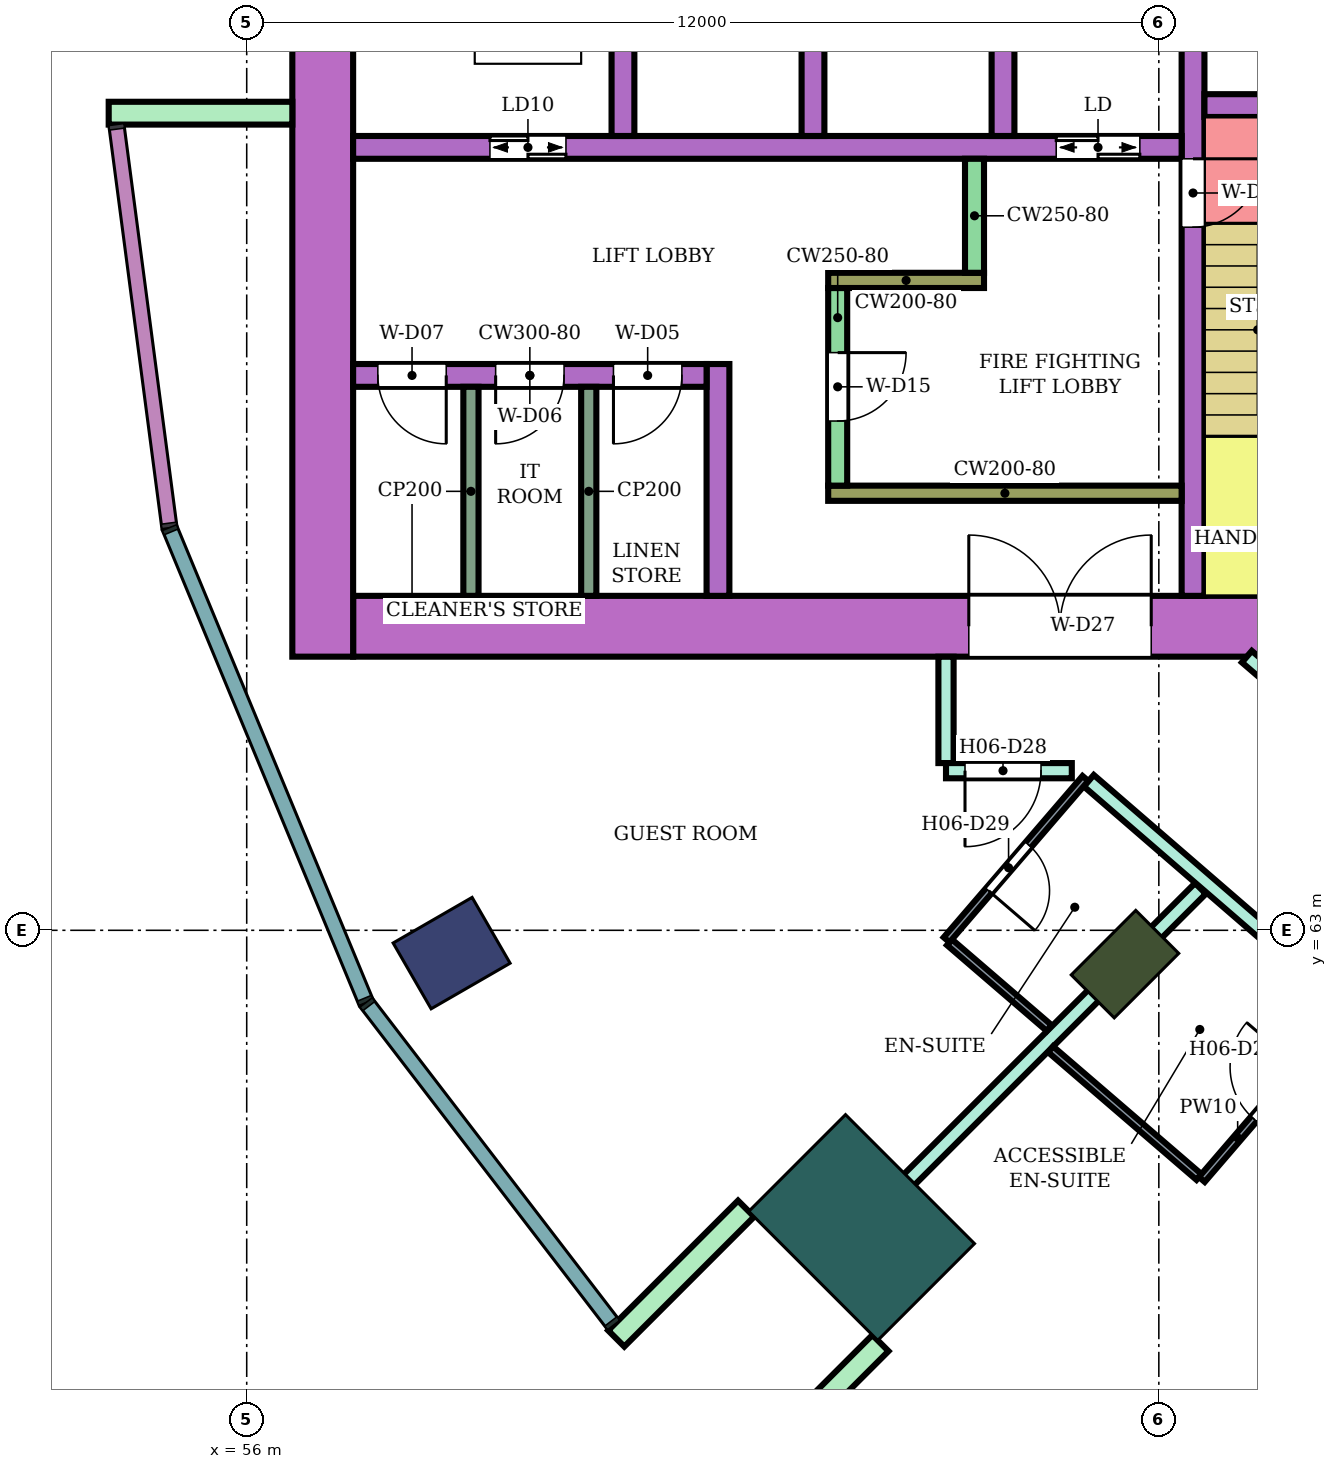
"""IFC4 building model, lengths in metres.
Left out: names, types, materials, properties, quantities, classifications, styles, units other than length and angle.
Written with IfcOpenShell. Run it as: python <this file> out.ifc"""

import sys

from ifc_helpers import new_model, si_unit, direction, frame, frame_2d, origin, origin_2d, place, context, subcontext, project, spatial, rectangle, extrude, element, fill, save


model = new_model("IFC4")
c1 = context("Model", 3, precision=1e-05, world=origin(), true_north=direction((0.0, 1.0)))
c2 = subcontext(c1, "Body", "Model", "MODEL_VIEW")
j1 = project(units=[si_unit("LENGTHUNIT", "METRE"), si_unit("PLANEANGLEUNIT", "RADIAN")], contexts=[c1])
p1 = place(None, origin())
s1 = spatial("IfcSite", under=j1, at=p1, CompositionType="ELEMENT")
p2 = place(p1, origin())
s2 = spatial("IfcBuilding", under=s1, at=p2, CompositionType="ELEMENT")
p3 = place(p2, frame((0.0, 0.0, 93.8)))
s3 = spatial("IfcBuildingStorey", under=s2, at=p3, CompositionType="ELEMENT", Elevation=93.8)
p4 = place(p3, frame((58.696, 62.7, 0.0), z_axis=(0.0, 0.0, 1.0), x_axis=(-0.866025403784, -0.5, 0.0)))
e1 = element("IfcColumn", 1, at=p4, inside=s3, PredefinedType="COLUMN", context=c2, shape_type="SweptSolid", body=[
    extrude(rectangle(XDim=1.2, YDim=1.0, at=origin_2d()), origin(), (0.0, 0.0, 1.0), 3.8),
])
p5 = place(p3, frame((67.555, 62.555, 0.0), z_axis=(0.0, 0.0, 1.0), x_axis=(-0.707106781187, -0.707106781187, 0.0)))
e2 = element("IfcColumn", 2, at=p5, inside=s3, PredefinedType="COLUMN", context=c2, shape_type="SweptSolid", body=[
    extrude(rectangle(XDim=1.2, YDim=0.8, at=origin_2d()), origin(), (0.0, 0.0, 1.0), 3.8),
])
p6 = place(p3, frame((64.09, 59.09, 0.0), z_axis=(0.0, 0.0, 1.0), x_axis=(-0.707106781187, -0.707106781187, 0.0)))
e3 = element("IfcColumn", 3, at=p6, inside=s3, PredefinedType="COLUMN", context=c2, shape_type="SweptSolid", body=[
    extrude(rectangle(XDim=1.8, YDim=2.4, at=origin_2d()), origin(), (0.0, 0.0, 1.0), 3.8),
])
p7 = place(p3, frame((72.1, 67.0, 0.0), z_axis=(0.0, 0.0, 1.0), x_axis=(-1.0, 0.0, 0.0)))
e4 = element("IfcWall", 4, at=p7, inside=s3, PredefinedType="SHEAR", context=c2, shape_type="SweptSolid", body=[
    extrude(rectangle(XDim=14.7, YDim=0.8, at=frame_2d((7.35, 0.0))), origin(), (0.0, 0.0, 1.0), 3.48),
])
p8 = place(p7, frame((4.2, 0.0, 0.0)))
e5 = element("IfcOpeningElement", 5, at=p8, cuts=e4, PredefinedType="OPENING", context=c2, shape_type="SweptSolid", body=[
    extrude(rectangle(XDim=2.4, YDim=2.4, at=frame_2d((1.2, 1.2))), frame((0.0, 0.41, 0.0), z_axis=(0.0, -1.0, 0.0), x_axis=(1.0, 0.0, 0.0)), (0.0, 0.0, 1.0), 0.82),
])
p9 = place(p3, frame((57.0, 83.4, 0.0), z_axis=(0.0, 0.0, 1.0), x_axis=(0.0, -1.0, 0.0)))
e6 = element("IfcWall", 6, at=p9, inside=s3, PredefinedType="SHEAR", context=c2, shape_type="SweptSolid", body=[
    extrude(rectangle(XDim=16.8, YDim=0.8, at=frame_2d((8.4, 0.0))), origin(), (0.0, 0.0, 1.0), 3.48),
])
p10 = place(p3, frame((68.45, 75.0, 0.0), z_axis=(0.0, 0.0, 1.0), x_axis=(0.0, -1.0, 0.0)))
e7 = element("IfcWall", 7, at=p10, inside=s3, PredefinedType="SHEAR", context=c2, shape_type="SweptSolid", body=[
    extrude(rectangle(XDim=7.6, YDim=0.3, at=frame_2d((3.8, 0.0))), origin(), (0.0, 0.0, 1.0), 3.48),
])
p11 = place(p10, frame((1.85, 0.0, 0.0)))
e8 = element("IfcOpeningElement", 8, at=p11, cuts=e7, PredefinedType="OPENING", context=c2, shape_type="SweptSolid", body=[
    extrude(rectangle(XDim=0.9, YDim=2.1, at=frame_2d((0.45, 1.05))), frame((0.0, 0.16, 0.0), z_axis=(0.0, -1.0, 0.0), x_axis=(1.0, 0.0, 0.0)), (0.0, 0.0, 1.0), 0.32),
])
p12 = place(p3, frame((71.65, 73.85, 0.0), z_axis=(0.0, 0.0, 1.0), x_axis=(-1.0, 0.0, 0.0)))
e9 = element("IfcWall", 9, at=p12, inside=s3, PredefinedType="SHEAR", context=c2, shape_type="SweptSolid", body=[
    extrude(rectangle(XDim=3.05, YDim=0.3, at=frame_2d((1.525, 0.0))), origin(), (0.0, 0.0, 1.0), 3.48),
])
p13 = place(p12, frame((1.1, 0.0, 0.0)))
e10 = element("IfcOpeningElement", 10, at=p13, cuts=e9, PredefinedType="OPENING", context=c2, shape_type="SweptSolid", body=[
    extrude(rectangle(XDim=0.7, YDim=2.0, at=frame_2d((0.35, 1.0))), frame((0.0, 0.16, 0.0), z_axis=(0.0, -1.0, 0.0), x_axis=(1.0, 0.0, 0.0)), (0.0, 0.0, 1.0), 0.32),
])
p14 = place(p3, frame((68.3, 73.3, 0.0), z_axis=(0.0, 0.0, 1.0), x_axis=(-1.0, 0.0, 0.0)))
e11 = element("IfcWall", 11, at=p14, inside=s3, PredefinedType="SHEAR", context=c2, shape_type="SweptSolid", body=[
    extrude(rectangle(XDim=10.9, YDim=0.3, at=frame_2d((5.45, 0.0))), origin(), (0.0, 0.0, 1.0), 3.48),
])
p15 = place(p14, frame((0.55, 0.0, 0.0)))
e12 = element("IfcOpeningElement", 12, at=p15, cuts=e11, PredefinedType="OPENING", context=c2, shape_type="SweptSolid", body=[
    extrude(rectangle(XDim=1.1, YDim=2.1, at=frame_2d((0.55, 1.05))), frame((0.0, 0.16, 0.0), z_axis=(0.0, -1.0, 0.0), x_axis=(1.0, 0.0, 0.0)), (0.0, 0.0, 1.0), 0.32),
])
p16 = place(p14, frame((8.1, 0.0, 0.0)))
e13 = element("IfcOpeningElement", 13, at=p16, cuts=e11, PredefinedType="OPENING", context=c2, shape_type="SweptSolid", body=[
    extrude(rectangle(XDim=1.0, YDim=2.1, at=frame_2d((0.5, 1.05))), frame((0.0, 0.16, 0.0), z_axis=(0.0, -1.0, 0.0), x_axis=(1.0, 0.0, 0.0)), (0.0, 0.0, 1.0), 0.32),
])
for number, where, z_axis, x_axis in (
    (14, (65.95, 76.0, 0.0), (0.0, 0.0, 1.0), (0.0, -1.0, 0.0)),
    (15, (63.45, 76.0, 0.0), (0.0, 0.0, 1.0), (0.0, -1.0, 0.0)),
    (16, (60.95, 76.0, 0.0), (0.0, 0.0, 1.0), (0.0, -1.0, 0.0)),
):
    element("IfcWall", number, at=place(p3, frame(where, z_axis=z_axis, x_axis=x_axis)), inside=s3, PredefinedType="SHEAR", context=c2, shape_type="SweptSolid", body=[
        extrude(rectangle(XDim=2.55, YDim=0.3, at=frame_2d((1.275, 0.0))), origin(), (0.0, 0.0, 1.0), 3.48),
    ])
p17 = place(p3, frame((68.3, 68.75, 0.0), z_axis=(0.0, 0.0, 1.0), x_axis=(-1.0, 0.0, 0.0)))
e17 = element("IfcWall", 17, at=p17, inside=s3, PredefinedType="SHEAR", context=c2, shape_type="SweptSolid", body=[
    extrude(rectangle(XDim=4.65, YDim=0.2, at=frame_2d((2.325, 0.0))), origin(), (0.0, 0.0, 1.0), 3.48),
])
p18 = place(p3, frame((63.775, 71.45, 0.0), z_axis=(0.0, 0.0, 1.0), x_axis=(0.0, -1.0, 0.0)))
e18 = element("IfcWall", 18, at=p18, inside=s3, PredefinedType="SHEAR", context=c2, shape_type="SweptSolid", body=[
    extrude(rectangle(XDim=2.6, YDim=0.25, at=frame_2d((1.3, 0.0))), origin(), (0.0, 0.0, 1.0), 3.48),
])
p19 = place(p18, frame((0.85, 0.0, 0.0)))
e19 = element("IfcOpeningElement", 19, at=p19, cuts=e18, PredefinedType="OPENING", context=c2, shape_type="SweptSolid", body=[
    extrude(rectangle(XDim=0.9, YDim=2.1, at=frame_2d((0.45, 1.05))), frame((0.0, 0.135, 0.0), z_axis=(0.0, -1.0, 0.0), x_axis=(1.0, 0.0, 0.0)), (0.0, 0.0, 1.0), 0.27),
])
p20 = place(p3, frame((65.7, 71.55, 0.0), z_axis=(0.0, 0.0, 1.0), x_axis=(-1.0, 0.0, 0.0)))
e20 = element("IfcWall", 20, at=p20, inside=s3, PredefinedType="SHEAR", context=c2, shape_type="SweptSolid", body=[
    extrude(rectangle(XDim=2.05, YDim=0.2, at=frame_2d((1.025, 0.0))), origin(), (0.0, 0.0, 1.0), 3.48),
])
p21 = place(p3, frame((65.575, 73.15, 0.0), z_axis=(0.0, 0.0, 1.0), x_axis=(0.0, -1.0, 0.0)))
e21 = element("IfcWall", 21, at=p21, inside=s3, PredefinedType="SHEAR", context=c2, shape_type="SweptSolid", body=[
    extrude(rectangle(XDim=1.5, YDim=0.25, at=frame_2d((0.75, 0.0))), origin(), (0.0, 0.0, 1.0), 3.48),
])
p22 = place(p3, frame((62.2, 70.45, 0.0), z_axis=(0.0, 0.0, 1.0), x_axis=(0.0, -1.0, 0.0)))
e22 = element("IfcWall", 22, at=p22, inside=s3, PredefinedType="SHEAR", context=c2, shape_type="SweptSolid", body=[
    extrude(rectangle(XDim=3.05, YDim=0.3, at=frame_2d((1.525, 0.0))), origin(), (0.0, 0.0, 1.0), 3.48),
])
p23 = place(p3, frame((62.05, 70.3, 0.0), z_axis=(0.0, 0.0, 1.0), x_axis=(-1.0, 0.0, 0.0)))
e23 = element("IfcWall", 23, at=p23, inside=s3, PredefinedType="SHEAR", context=c2, shape_type="SweptSolid", body=[
    extrude(rectangle(XDim=4.65, YDim=0.3, at=frame_2d((2.325, 0.0))), origin(), (0.0, 0.0, 1.0), 3.48),
])
p24 = place(p23, frame((0.325, 0.0, 0.0)))
e24 = element("IfcOpeningElement", 24, at=p24, cuts=e23, PredefinedType="OPENING", context=c2, shape_type="SweptSolid", body=[
    extrude(rectangle(XDim=0.9, YDim=2.1, at=frame_2d((0.45, 1.05))), frame((0.0, 0.16, 0.0), z_axis=(0.0, -1.0, 0.0), x_axis=(1.0, 0.0, 0.0)), (0.0, 0.0, 1.0), 0.32),
])
p25 = place(p23, frame((1.875, 0.0, 0.0)))
e25 = element("IfcOpeningElement", 25, at=p25, cuts=e23, PredefinedType="OPENING", context=c2, shape_type="SweptSolid", body=[
    extrude(rectangle(XDim=0.9, YDim=2.1, at=frame_2d((0.45, 1.05))), frame((0.0, 0.16, 0.0), z_axis=(0.0, -1.0, 0.0), x_axis=(1.0, 0.0, 0.0)), (0.0, 0.0, 1.0), 0.32),
])
p26 = place(p23, frame((3.425, 0.0, 0.0)))
e26 = element("IfcOpeningElement", 26, at=p26, cuts=e23, PredefinedType="OPENING", context=c2, shape_type="SweptSolid", body=[
    extrude(rectangle(XDim=0.9, YDim=2.1, at=frame_2d((0.45, 1.05))), frame((0.0, 0.16, 0.0), z_axis=(0.0, -1.0, 0.0), x_axis=(1.0, 0.0, 0.0)), (0.0, 0.0, 1.0), 0.32),
])
for number, where, z_axis, x_axis in (
    (27, (56.6, 73.75, 0.0), (0.0, 0.0, 1.0), (-1.0, 0.0, 0.0)),
    (28, (62.57, 59.338, 0.0), (0.0, 0.0, 1.0), (-0.707, -0.707, 0.0)),
    (29, (64.338, 57.57, 0.0), (0.0, 0.0, 1.0), (-0.707, -0.707, 0.0)),
):
    element("IfcWall", number, at=place(p3, frame(where, z_axis=z_axis, x_axis=x_axis)), inside=s3, PredefinedType="NOTDEFINED", context=c2, shape_type="SweptSolid", body=[
        extrude(rectangle(XDim=2.416, YDim=0.3, at=frame_2d((1.208, 0.0))), origin(), (0.0, 0.0, 1.0), 3.8),
    ])
p27 = place(p3, frame((63.594, 58.598, 0.0), z_axis=(0.0, 0.0, 1.0), x_axis=(0.707228748718, 0.706984792613, 0.0)))
e30 = element("IfcWall", 30, at=p27, inside=s3, PredefinedType="PARTITIONING", context=c2, shape_type="SweptSolid", body=[
    extrude(rectangle(XDim=7.005, YDim=0.2, at=frame_2d((3.503, 0.0))), origin(), (0.0, 0.0, 1.0), 3.35),
])
p28 = place(p3, frame((65.2, 65.2, 0.0), z_axis=(0.0, 0.0, 1.0), x_axis=(0.0, 1.0, 0.0)))
e31 = element("IfcWall", 31, at=p28, inside=s3, PredefinedType="PARTITIONING", context=c2, shape_type="SweptSolid", body=[
    extrude(rectangle(XDim=1.399, YDim=0.2, at=frame_2d((0.7, 0.0))), origin(), (0.0, 0.0, 1.0), 3.35),
])
p29 = place(p3, frame((65.2, 65.1, 0.0), z_axis=(0.0, 0.0, 1.0), x_axis=(1.0, 0.0, 0.0)))
e32 = element("IfcWall", 32, at=p29, inside=s3, PredefinedType="PARTITIONING", context=c2, shape_type="SweptSolid", body=[
    extrude(rectangle(XDim=1.655, YDim=0.2, at=frame_2d((0.828, 0.0))), origin(), (0.0, 0.0, 1.0), 3.35),
])
p30 = place(p29, frame((0.25, 0.0, 0.0)))
e33 = element("IfcOpeningElement", 33, at=p30, cuts=e32, PredefinedType="OPENING", context=c2, shape_type="SweptSolid", body=[
    extrude(rectangle(XDim=1.0, YDim=2.1, at=frame_2d((0.5, 1.05))), frame((0.0, 0.11, 0.0), z_axis=(0.0, -1.0, 0.0), x_axis=(1.0, 0.0, 0.0)), (0.0, 0.0, 1.0), 0.22),
])
p31 = place(p3, frame((67.079, 64.968, 0.0), z_axis=(0.0, 0.0, 1.0), x_axis=(0.756371089567, -0.654142778656, 0.0)))
e34 = element("IfcWall", 34, at=p31, inside=s3, PredefinedType="PARTITIONING", context=c2, shape_type="SweptSolid", body=[
    extrude(rectangle(XDim=6.185, YDim=0.2, at=frame_2d((3.093, 0.0))), origin(), (0.0, 0.0, 1.0), 3.35),
])
p32 = place(p31, frame((4.778, 0.0, 0.0)))
e35 = element("IfcOpeningElement", 35, at=p32, cuts=e34, PredefinedType="OPENING", context=c2, shape_type="SweptSolid", body=[
    extrude(rectangle(XDim=1.1, YDim=2.1, at=frame_2d((0.55, 1.05))), frame((0.0, 0.11, 0.0), z_axis=(0.0, -1.0, 0.0), x_axis=(1.0, 0.0, 0.0)), (0.0, 0.0, 1.0), 0.22),
])
p33 = place(p3, frame((67.096, 52.662, 0.0), z_axis=(0.0, 0.0, 1.0), x_axis=(0.500222922337, 0.865896661253, 0.0)))
e36 = element("IfcWall", 36, at=p33, inside=s3, PredefinedType="PARTITIONING", context=c2, shape_type="SweptSolid", body=[
    extrude(rectangle(XDim=9.374, YDim=0.2, at=frame_2d((4.687, 0.0))), origin(), (0.0, 0.0, 1.0), 3.35),
])
p34 = place(p3, frame((69.158, 66.6, 0.0), z_axis=(0.0, 0.0, 1.0), x_axis=(0.757976058094, -0.652282373943, 0.0)))
e37 = element("IfcWall", 37, at=p34, inside=s3, PredefinedType="PARTITIONING", context=c2, shape_type="SweptSolid", body=[
    extrude(rectangle(XDim=5.16, YDim=0.2, at=frame_2d((2.58, 0.0))), origin(), (0.0, 0.0, 1.0), 3.35),
])
p35 = place(p34, frame((1.6, 0.0, 0.0)))
e38 = element("IfcOpeningElement", 38, at=p35, cuts=e37, PredefinedType="OPENING", context=c2, shape_type="SweptSolid", body=[
    extrude(rectangle(XDim=1.0, YDim=2.1, at=frame_2d((0.5, 1.05))), frame((0.0, 0.11, 0.0), z_axis=(0.0, -1.0, 0.0), x_axis=(1.0, 0.0, 0.0)), (0.0, 0.0, 1.0), 0.22),
])
p36 = place(p3, frame((65.246, 62.842, 0.0), z_axis=(0.0, 0.0, 1.0), x_axis=(0.758030338995, -0.652219292234, 0.0)))
e39 = element("IfcWall", 39, at=p36, inside=s3, PredefinedType="PARTITIONING", context=c2, shape_type="SweptSolid", body=[
    extrude(rectangle(XDim=1.73, YDim=0.1, at=frame_2d((0.865, 0.0))), origin(), (0.0, 0.0, 1.0), 3.35),
])
p37 = place(p3, frame((65.208, 62.875, 0.0), z_axis=(0.0, 0.0, 1.0), x_axis=(0.65205430601, 0.758172264076, 0.0)))
e40 = element("IfcWall", 40, at=p37, inside=s3, PredefinedType="PARTITIONING", context=c2, shape_type="SweptSolid", body=[
    extrude(rectangle(XDim=2.8, YDim=0.1, at=frame_2d((1.4, 0.0))), origin(), (0.0, 0.0, 1.0), 3.35),
])
p38 = place(p37, frame((0.85, 0.0, 0.0)))
e41 = element("IfcOpeningElement", 41, at=p38, cuts=e40, PredefinedType="OPENING", context=c2, shape_type="SweptSolid", body=[
    extrude(rectangle(XDim=0.8, YDim=2.1, at=frame_2d((0.4, 1.05))), frame((0.0, 0.06, 0.0), z_axis=(0.0, -1.0, 0.0), x_axis=(1.0, 0.0, 0.0)), (0.0, 0.0, 1.0), 0.12),
])
p39 = place(p3, frame((66.576, 61.435, 0.0), z_axis=(0.0, 0.0, 1.0), x_axis=(0.757970550281, -0.652288774169, 0.0)))
e42 = element("IfcWall", 42, at=p39, inside=s3, PredefinedType="PARTITIONING", context=c2, shape_type="SweptSolid", body=[
    extrude(rectangle(XDim=2.576, YDim=0.1, at=frame_2d((1.288, 0.0))), origin(), (0.0, 0.0, 1.0), 3.35),
])
p40 = place(p3, frame((68.566, 59.722, 0.0), z_axis=(0.0, 0.0, 1.0), x_axis=(0.65193146671, 0.758277892803, 0.0)))
e43 = element("IfcWall", 43, at=p40, inside=s3, PredefinedType="PARTITIONING", context=c2, shape_type="SweptSolid", body=[
    extrude(rectangle(XDim=2.89, YDim=0.1, at=frame_2d((1.445, 0.0))), origin(), (0.0, 0.0, 1.0), 3.35),
])
p41 = place(p40, frame((1.05, 0.0, 0.0)))
e44 = element("IfcOpeningElement", 44, at=p41, cuts=e43, PredefinedType="OPENING", context=c2, shape_type="SweptSolid", body=[
    extrude(rectangle(XDim=0.9, YDim=2.1, at=frame_2d((0.45, 1.05))), frame((0.0, 0.06, 0.0), z_axis=(0.0, -1.0, 0.0), x_axis=(1.0, 0.0, 0.0)), (0.0, 0.0, 1.0), 0.12),
])
for number, where, z_axis, x_axis in (
    (45, (60.5, 70.15, 0.0), (0.0, 0.0, 1.0), (0.0, -1.0, 0.0)),
    (46, (58.95, 70.15, 0.0), (0.0, 0.0, 1.0), (0.0, -1.0, 0.0)),
):
    element("IfcWall", number, at=place(p3, frame(where, z_axis=z_axis, x_axis=x_axis)), inside=s3, PredefinedType="PARTITIONING", context=c2, shape_type="SweptSolid", body=[
        extrude(rectangle(XDim=2.75, YDim=0.2, at=frame_2d((1.375, 0.0))), origin(), (0.0, 0.0, 1.0), 3.48),
    ])
p42 = place(p41, origin())
e47 = element("IfcDoor", 47, at=p42, inside=s3, OperationType="SINGLE_SWING_RIGHT", PredefinedType="DOOR", context=c2, shape_type="SweptSolid", body=[
    extrude(rectangle(XDim=0.9, YDim=2.1, at=frame_2d((0.45, 1.05))), frame((0.0, 0.025, 0.0), z_axis=(0.0, -1.0, 0.0), x_axis=(1.0, 0.0, 0.0)), (0.0, 0.0, 1.0), 0.05),
])
fill(e44, e47)
p43 = place(p30, frame((1.0, 0.0, 0.0), z_axis=(0.0, 0.0, 1.0), x_axis=(-1.0, 0.0, 0.0)))
e48 = element("IfcDoor", 48, at=p43, inside=s3, OperationType="SINGLE_SWING_RIGHT", PredefinedType="DOOR", context=c2, shape_type="SweptSolid", body=[
    extrude(rectangle(XDim=1.0, YDim=2.1, at=frame_2d((0.5, 1.05))), frame((0.0, 0.025, 0.0), z_axis=(0.0, -1.0, 0.0), x_axis=(1.0, 0.0, 0.0)), (0.0, 0.0, 1.0), 0.05),
])
fill(e33, e48)
p44 = place(p38, frame((0.8, 0.0, 0.0), z_axis=(0.0, 0.0, 1.0), x_axis=(-1.0, 0.0, 0.0)))
e49 = element("IfcDoor", 49, at=p44, inside=s3, OperationType="SINGLE_SWING_RIGHT", PredefinedType="DOOR", context=c2, shape_type="SweptSolid", body=[
    extrude(rectangle(XDim=0.8, YDim=2.1, at=frame_2d((0.4, 1.05))), frame((0.0, 0.025, 0.0), z_axis=(0.0, -1.0, 0.0), x_axis=(1.0, 0.0, 0.0)), (0.0, 0.0, 1.0), 0.05),
])
fill(e41, e49)
p45 = place(p11, origin())
e50 = element("IfcDoor", 50, at=p45, inside=s3, OperationType="SINGLE_SWING_LEFT", PredefinedType="DOOR", context=c2, shape_type="SweptSolid", body=[
    extrude(rectangle(XDim=0.9, YDim=2.1, at=frame_2d((0.45, 1.05))), frame((0.0, 0.025, 0.0), z_axis=(0.0, -1.0, 0.0), x_axis=(1.0, 0.0, 0.0)), (0.0, 0.0, 1.0), 0.05),
])
fill(e8, e50)
p46 = place(p15, origin())
e51 = element("IfcDoor", 51, at=p46, inside=s3, OperationType="DOUBLE_DOOR_SLIDING", PredefinedType="DOOR", context=c2, shape_type="SweptSolid", body=[
    extrude(rectangle(XDim=1.1, YDim=2.1, at=frame_2d((0.55, 1.05))), frame((0.0, 0.025, 0.0), z_axis=(0.0, -1.0, 0.0), x_axis=(1.0, 0.0, 0.0)), (0.0, 0.0, 1.0), 0.05),
])
fill(e12, e51)
p47 = place(p16, origin())
e52 = element("IfcDoor", 52, at=p47, inside=s3, OperationType="DOUBLE_DOOR_SLIDING", PredefinedType="DOOR", context=c2, shape_type="SweptSolid", body=[
    extrude(rectangle(XDim=1.0, YDim=2.1, at=frame_2d((0.5, 1.05))), frame((0.0, 0.025, 0.0), z_axis=(0.0, -1.0, 0.0), x_axis=(1.0, 0.0, 0.0)), (0.0, 0.0, 1.0), 0.05),
])
fill(e13, e52)
p48 = place(p19, origin())
e53 = element("IfcDoor", 53, at=p48, inside=s3, OperationType="SINGLE_SWING_LEFT", PredefinedType="DOOR", context=c2, shape_type="SweptSolid", body=[
    extrude(rectangle(XDim=0.9, YDim=2.1, at=frame_2d((0.45, 1.05))), frame((0.0, 0.025, 0.0), z_axis=(0.0, -1.0, 0.0), x_axis=(1.0, 0.0, 0.0)), (0.0, 0.0, 1.0), 0.05),
])
fill(e19, e53)
p49 = place(p24, origin())
e54 = element("IfcDoor", 54, at=p49, inside=s3, OperationType="SINGLE_SWING_RIGHT", PredefinedType="DOOR", context=c2, shape_type="SweptSolid", body=[
    extrude(rectangle(XDim=0.9, YDim=2.1, at=frame_2d((0.45, 1.05))), frame((0.0, 0.025, 0.0), z_axis=(0.0, -1.0, 0.0), x_axis=(1.0, 0.0, 0.0)), (0.0, 0.0, 1.0), 0.05),
])
fill(e24, e54)
p50 = place(p25, origin())
e55 = element("IfcDoor", 55, at=p50, inside=s3, OperationType="SINGLE_SWING_RIGHT", PredefinedType="DOOR", context=c2, shape_type="SweptSolid", body=[
    extrude(rectangle(XDim=0.9, YDim=2.1, at=frame_2d((0.45, 1.05))), frame((0.0, 0.025, 0.0), z_axis=(0.0, -1.0, 0.0), x_axis=(1.0, 0.0, 0.0)), (0.0, 0.0, 1.0), 0.05),
])
fill(e25, e55)
p51 = place(p26, origin())
e56 = element("IfcDoor", 56, at=p51, inside=s3, OperationType="SINGLE_SWING_LEFT", PredefinedType="DOOR", context=c2, shape_type="SweptSolid", body=[
    extrude(rectangle(XDim=0.9, YDim=2.1, at=frame_2d((0.45, 1.05))), frame((0.0, 0.025, 0.0), z_axis=(0.0, -1.0, 0.0), x_axis=(1.0, 0.0, 0.0)), (0.0, 0.0, 1.0), 0.05),
])
fill(e26, e56)
p52 = place(p8, frame((2.4, 0.0, 0.0), z_axis=(0.0, 0.0, 1.0), x_axis=(-1.0, 0.0, 0.0)))
e57 = element("IfcDoor", 57, at=p52, inside=s3, OperationType="DOUBLE_DOOR_SINGLE_SWING", PredefinedType="DOOR", context=c2, shape_type="SweptSolid", body=[
    extrude(rectangle(XDim=2.4, YDim=2.4, at=frame_2d((1.2, 1.2))), frame((0.0, 0.025, 0.0), z_axis=(0.0, -1.0, 0.0), x_axis=(1.0, 0.0, 0.0)), (0.0, 0.0, 1.0), 0.05),
])
fill(e5, e57)
save(model, sys.argv[1])
